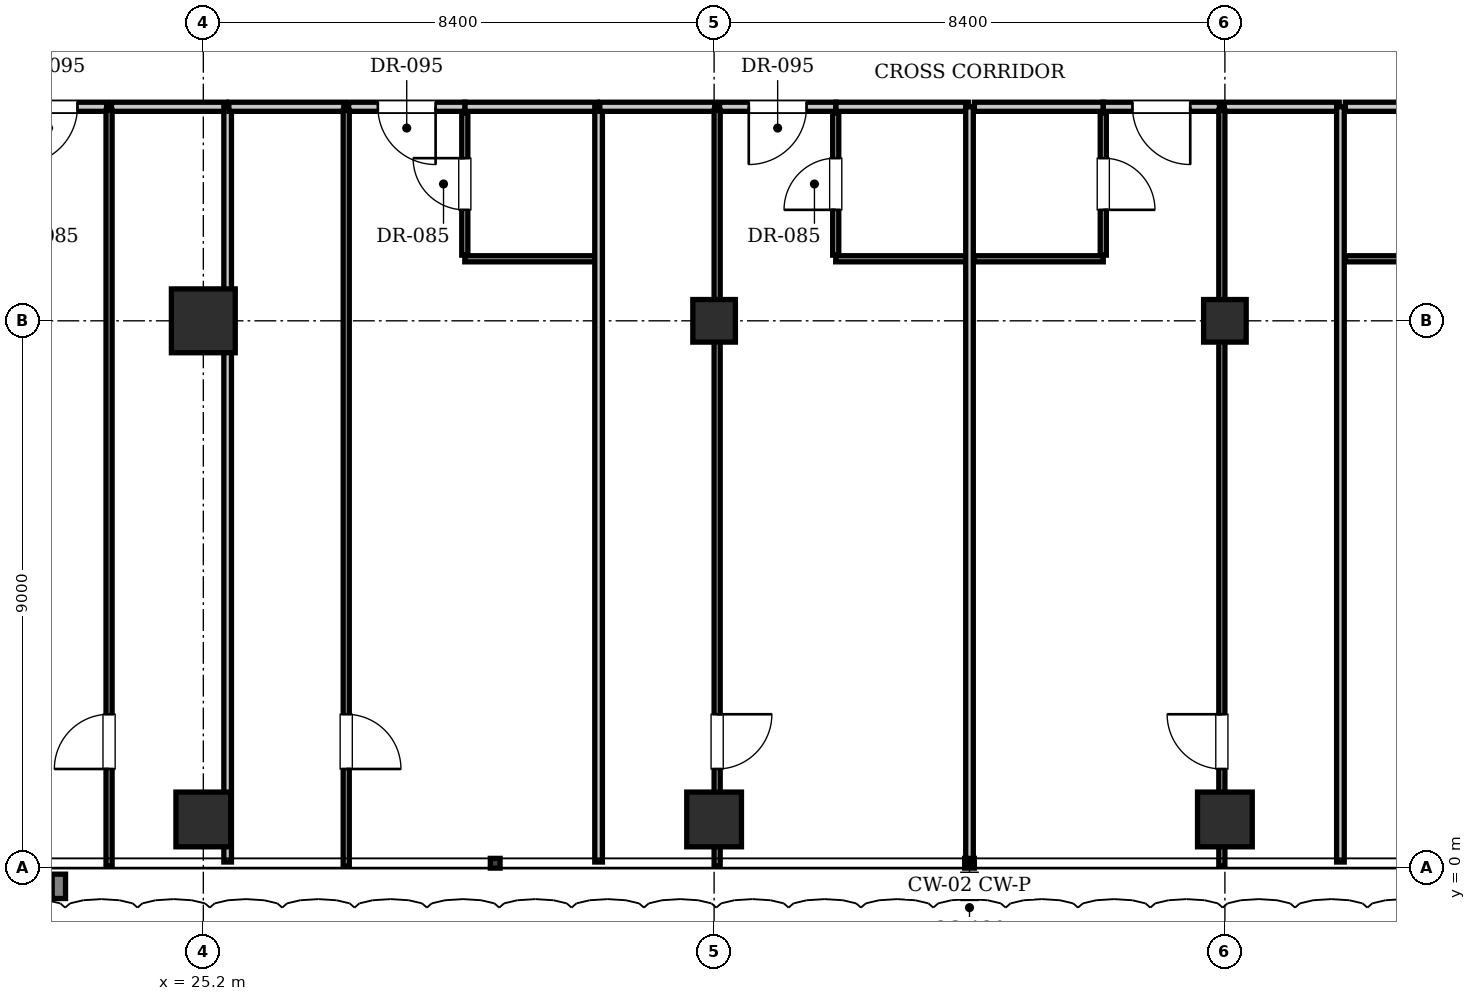
"""IFC4 building model, lengths in metres.
Left out: names, types, materials, properties, quantities, classifications, styles, units other than length and angle.
Written with IfcOpenShell. Run it as: python <this file> out.ifc"""

import sys

from ifc_helpers import new_model, si_unit, direction, frame, frame_2d, origin, origin_2d, place, context, subcontext, project, spatial, rectangle, i_section, extrude, element, fill, save


model = new_model("IFC4")
c1 = context("Model", 3, precision=1e-05, world=origin(), true_north=direction((0.0, 1.0)))
c2 = subcontext(c1, "Body", "Model", "MODEL_VIEW")
j1 = project(units=[si_unit("LENGTHUNIT", "METRE"), si_unit("PLANEANGLEUNIT", "RADIAN")], contexts=[c1])
p1 = place(None, origin())
s1 = spatial("IfcSite", under=j1, at=p1, CompositionType="ELEMENT")
p2 = place(p1, origin())
s2 = spatial("IfcBuilding", under=s1, at=p2, CompositionType="ELEMENT")
p3 = place(p2, frame((0.0, 0.0, 30.8)))
s3 = spatial("IfcBuildingStorey", under=s2, at=p3, CompositionType="ELEMENT", Elevation=30.8)
p4 = place(p3, frame((25.2, 9.0, 0.0), z_axis=(0.0, 0.0, 1.0), x_axis=(1.0, 0.0, 0.0)))
e1 = element("IfcColumn", 1, at=p4, inside=s3, PredefinedType="COLUMN", context=c2, shape_type="SweptSolid", body=[
    extrude(rectangle(XDim=1.05, YDim=1.05, at=origin_2d()), origin(), (0.0, 0.0, 1.0), 3.85),
])
for number, where, z_axis, x_axis in (
    (2, (33.6, 9.0, 0.0), (0.0, 0.0, 1.0), (1.0, 0.0, 0.0)),
    (3, (42.0, 9.0, 0.0), (0.0, 0.0, 1.0), (1.0, 0.0, 0.0)),
):
    element("IfcColumn", number, at=place(p3, frame(where, z_axis=z_axis, x_axis=x_axis)), inside=s3, PredefinedType="COLUMN", context=c2, shape_type="SweptSolid", body=[
        extrude(i_section(OverallWidth=0.7, OverallDepth=0.7, WebThickness=0.028, FlangeThickness=0.044, at=origin_2d()), origin(), (0.0, 0.0, 1.0), 3.85),
    ])
for number, where, z_axis, x_axis in (
    (4, (25.2, 0.8, 0.0), (0.0, 0.0, 1.0), (1.0, 0.0, 0.0)),
    (5, (33.6, 0.8, 0.0), (0.0, 0.0, 1.0), (1.0, 0.0, 0.0)),
    (6, (42.0, 0.8, 0.0), (0.0, 0.0, 1.0), (1.0, 0.0, 0.0)),
):
    element("IfcColumn", number, at=place(p3, frame(where, z_axis=z_axis, x_axis=x_axis)), inside=s3, PredefinedType="COLUMN", context=c2, shape_type="SweptSolid", body=[
        extrude(rectangle(XDim=0.9, YDim=0.9, at=origin_2d()), origin(), (0.0, 0.0, 1.0), 3.85),
    ])
p5 = place(p3, frame((21.7, 12.52, 0.0), z_axis=(0.0, 0.0, 1.0), x_axis=(1.0, 0.0, 0.0)))
e7 = element("IfcWall", 7, at=p5, inside=s3, PredefinedType="PARTITIONING", context=c2, shape_type="SweptSolid", body=[
    extrude(rectangle(XDim=1.91, YDim=0.15, at=frame_2d((0.955, 0.0))), origin(), (0.0, 0.0, 1.0), 3.61),
])
p6 = place(p5, frame((0.48, 0.0, 0.0)))
e8 = element("IfcOpeningElement", 8, at=p6, cuts=e7, PredefinedType="OPENING", context=c2, shape_type="SweptSolid", body=[
    extrude(rectangle(XDim=0.95, YDim=2.15, at=frame_2d((0.475, 1.075))), frame((0.0, 0.085, 0.0), z_axis=(0.0, -1.0, 0.0), x_axis=(1.0, 0.0, 0.0)), (0.0, 0.0, 1.0), 0.17),
])
p7 = place(p3, frame((23.69, 12.52, 0.0), z_axis=(0.0, 0.0, 1.0), x_axis=(1.0, 0.0, 0.0)))
e9 = element("IfcWall", 9, at=p7, inside=s3, PredefinedType="PARTITIONING", context=c2, shape_type="SweptSolid", body=[
    extrude(rectangle(XDim=1.89, YDim=0.15, at=frame_2d((0.945, 0.0))), origin(), (0.0, 0.0, 1.0), 3.61),
])
p8 = place(p3, frame((23.65, 0.03, 0.0), z_axis=(0.0, 0.0, 1.0), x_axis=(0.0, 1.0, 0.0)))
e10 = element("IfcWall", 10, at=p8, inside=s3, PredefinedType="PARTITIONING", context=c2, shape_type="SweptSolid", body=[
    extrude(rectangle(XDim=12.43, YDim=0.1, at=frame_2d((6.215, 0.0))), origin(), (0.0, 0.0, 1.0), 3.61),
])
p9 = place(p8, frame((1.6, 0.0, 0.0)))
e11 = element("IfcOpeningElement", 11, at=p9, cuts=e10, PredefinedType="OPENING", context=c2, shape_type="SweptSolid", body=[
    extrude(rectangle(XDim=0.9, YDim=2.1, at=frame_2d((0.45, 1.05))), frame((0.0, 0.06, 0.0), z_axis=(0.0, -1.0, 0.0), x_axis=(1.0, 0.0, 0.0)), (0.0, 0.0, 1.0), 0.12),
])
p10 = place(p3, frame((25.6, 0.1, 0.0), z_axis=(0.0, 0.0, 1.0), x_axis=(0.0, 1.0, 0.0)))
e12 = element("IfcWall", 12, at=p10, inside=s3, PredefinedType="PARTITIONING", context=c2, shape_type="SweptSolid", body=[
    extrude(rectangle(XDim=12.42, YDim=0.125, at=frame_2d((6.21, 0.0))), origin(), (0.0, 0.0, 1.0), 3.61),
])
p11 = place(p3, frame((29.5, 12.52, 0.0), z_axis=(0.0, 0.0, 1.0), x_axis=(1.0, 0.0, 0.0)))
e13 = element("IfcWall", 13, at=p11, inside=s3, PredefinedType="PARTITIONING", context=c2, shape_type="SweptSolid", body=[
    extrude(rectangle(XDim=2.18, YDim=0.15, at=frame_2d((1.09, 0.0))), origin(), (0.0, 0.0, 1.0), 3.61),
])
p12 = place(p3, frame((29.5, 10.02, 0.0), z_axis=(0.0, 0.0, 1.0), x_axis=(1.0, 0.0, 0.0)))
e14 = element("IfcWall", 14, at=p12, inside=s3, PredefinedType="PARTITIONING", context=c2, shape_type="SweptSolid", body=[
    extrude(rectangle(XDim=2.16, YDim=0.1, at=frame_2d((1.08, 0.0))), origin(), (0.0, 0.0, 1.0), 3.61),
])
p13 = place(p3, frame((29.5, 10.08, 0.0), z_axis=(0.0, 0.0, 1.0), x_axis=(0.0, 1.0, 0.0)))
e15 = element("IfcWall", 15, at=p13, inside=s3, PredefinedType="PARTITIONING", context=c2, shape_type="SweptSolid", body=[
    extrude(rectangle(XDim=2.34, YDim=0.1, at=frame_2d((1.17, 0.0))), origin(), (0.0, 0.0, 1.0), 3.61),
])
p14 = place(p13, frame((0.745, 0.0, 0.0)))
e16 = element("IfcOpeningElement", 16, at=p14, cuts=e15, PredefinedType="OPENING", context=c2, shape_type="SweptSolid", body=[
    extrude(rectangle(XDim=0.85, YDim=2.1, at=frame_2d((0.425, 1.05))), frame((0.0, 0.06, 0.0), z_axis=(0.0, -1.0, 0.0), x_axis=(1.0, 0.0, 0.0)), (0.0, 0.0, 1.0), 0.12),
])
p15 = place(p3, frame((25.62, 12.52, 0.0), z_axis=(0.0, 0.0, 1.0), x_axis=(1.0, 0.0, 0.0)))
e17 = element("IfcWall", 17, at=p15, inside=s3, PredefinedType="PARTITIONING", context=c2, shape_type="SweptSolid", body=[
    extrude(rectangle(XDim=1.89, YDim=0.15, at=frame_2d((0.945, 0.0))), origin(), (0.0, 0.0, 1.0), 3.61),
])
p16 = place(p3, frame((27.59, 12.52, 0.0), z_axis=(0.0, 0.0, 1.0), x_axis=(1.0, 0.0, 0.0)))
e18 = element("IfcWall", 18, at=p16, inside=s3, PredefinedType="PARTITIONING", context=c2, shape_type="SweptSolid", body=[
    extrude(rectangle(XDim=1.91, YDim=0.15, at=frame_2d((0.955, 0.0))), origin(), (0.0, 0.0, 1.0), 3.61),
])
p17 = place(p16, frame((0.48, 0.0, 0.0)))
e19 = element("IfcOpeningElement", 19, at=p17, cuts=e18, PredefinedType="OPENING", context=c2, shape_type="SweptSolid", body=[
    extrude(rectangle(XDim=0.95, YDim=2.15, at=frame_2d((0.475, 1.075))), frame((0.0, 0.085, 0.0), z_axis=(0.0, -1.0, 0.0), x_axis=(1.0, 0.0, 0.0)), (0.0, 0.0, 1.0), 0.17),
])
p18 = place(p3, frame((27.55, 0.03, 0.0), z_axis=(0.0, 0.0, 1.0), x_axis=(0.0, 1.0, 0.0)))
e20 = element("IfcWall", 20, at=p18, inside=s3, PredefinedType="PARTITIONING", context=c2, shape_type="SweptSolid", body=[
    extrude(rectangle(XDim=12.43, YDim=0.1, at=frame_2d((6.215, 0.0))), origin(), (0.0, 0.0, 1.0), 3.61),
])
p19 = place(p18, frame((1.6, 0.0, 0.0)))
e21 = element("IfcOpeningElement", 21, at=p19, cuts=e20, PredefinedType="OPENING", context=c2, shape_type="SweptSolid", body=[
    extrude(rectangle(XDim=0.9, YDim=2.1, at=frame_2d((0.45, 1.05))), frame((0.0, 0.06, 0.0), z_axis=(0.0, -1.0, 0.0), x_axis=(1.0, 0.0, 0.0)), (0.0, 0.0, 1.0), 0.12),
])
p20 = place(p3, frame((31.7, 0.1, 0.0), z_axis=(0.0, 0.0, 1.0), x_axis=(0.0, 1.0, 0.0)))
e22 = element("IfcWall", 22, at=p20, inside=s3, PredefinedType="PARTITIONING", context=c2, shape_type="SweptSolid", body=[
    extrude(rectangle(XDim=12.42, YDim=0.125, at=frame_2d((6.21, 0.0))), origin(), (0.0, 0.0, 1.0), 3.61),
])
p21 = place(p3, frame((35.6, 12.52, 0.0), z_axis=(0.0, 0.0, 1.0), x_axis=(1.0, 0.0, 0.0)))
e23 = element("IfcWall", 23, at=p21, inside=s3, PredefinedType="PARTITIONING", context=c2, shape_type="SweptSolid", body=[
    extrude(rectangle(XDim=2.18, YDim=0.15, at=frame_2d((1.09, 0.0))), origin(), (0.0, 0.0, 1.0), 3.61),
])
p22 = place(p3, frame((35.6, 10.02, 0.0), z_axis=(0.0, 0.0, 1.0), x_axis=(1.0, 0.0, 0.0)))
e24 = element("IfcWall", 24, at=p22, inside=s3, PredefinedType="PARTITIONING", context=c2, shape_type="SweptSolid", body=[
    extrude(rectangle(XDim=2.16, YDim=0.1, at=frame_2d((1.08, 0.0))), origin(), (0.0, 0.0, 1.0), 3.61),
])
p23 = place(p3, frame((35.6, 10.08, 0.0), z_axis=(0.0, 0.0, 1.0), x_axis=(0.0, 1.0, 0.0)))
e25 = element("IfcWall", 25, at=p23, inside=s3, PredefinedType="PARTITIONING", context=c2, shape_type="SweptSolid", body=[
    extrude(rectangle(XDim=2.34, YDim=0.1, at=frame_2d((1.17, 0.0))), origin(), (0.0, 0.0, 1.0), 3.61),
])
p24 = place(p23, frame((0.745, 0.0, 0.0)))
e26 = element("IfcOpeningElement", 26, at=p24, cuts=e25, PredefinedType="OPENING", context=c2, shape_type="SweptSolid", body=[
    extrude(rectangle(XDim=0.85, YDim=2.1, at=frame_2d((0.425, 1.05))), frame((0.0, 0.06, 0.0), z_axis=(0.0, -1.0, 0.0), x_axis=(1.0, 0.0, 0.0)), (0.0, 0.0, 1.0), 0.12),
])
p25 = place(p3, frame((31.72, 12.52, 0.0), z_axis=(0.0, 0.0, 1.0), x_axis=(1.0, 0.0, 0.0)))
e27 = element("IfcWall", 27, at=p25, inside=s3, PredefinedType="PARTITIONING", context=c2, shape_type="SweptSolid", body=[
    extrude(rectangle(XDim=1.89, YDim=0.15, at=frame_2d((0.945, 0.0))), origin(), (0.0, 0.0, 1.0), 3.61),
])
p26 = place(p3, frame((33.69, 12.52, 0.0), z_axis=(0.0, 0.0, 1.0), x_axis=(1.0, 0.0, 0.0)))
e28 = element("IfcWall", 28, at=p26, inside=s3, PredefinedType="PARTITIONING", context=c2, shape_type="SweptSolid", body=[
    extrude(rectangle(XDim=1.91, YDim=0.15, at=frame_2d((0.955, 0.0))), origin(), (0.0, 0.0, 1.0), 3.61),
])
p27 = place(p26, frame((0.48, 0.0, 0.0)))
e29 = element("IfcOpeningElement", 29, at=p27, cuts=e28, PredefinedType="OPENING", context=c2, shape_type="SweptSolid", body=[
    extrude(rectangle(XDim=0.95, YDim=2.15, at=frame_2d((0.475, 1.075))), frame((0.0, 0.085, 0.0), z_axis=(0.0, -1.0, 0.0), x_axis=(1.0, 0.0, 0.0)), (0.0, 0.0, 1.0), 0.17),
])
p28 = place(p3, frame((33.65, 0.03, 0.0), z_axis=(0.0, 0.0, 1.0), x_axis=(0.0, 1.0, 0.0)))
e30 = element("IfcWall", 30, at=p28, inside=s3, PredefinedType="PARTITIONING", context=c2, shape_type="SweptSolid", body=[
    extrude(rectangle(XDim=12.43, YDim=0.1, at=frame_2d((6.215, 0.0))), origin(), (0.0, 0.0, 1.0), 2.975),
])
p29 = place(p28, frame((1.6, 0.0, 0.0)))
e31 = element("IfcOpeningElement", 31, at=p29, cuts=e30, PredefinedType="OPENING", context=c2, shape_type="SweptSolid", body=[
    extrude(rectangle(XDim=0.9, YDim=2.1, at=frame_2d((0.45, 1.05))), frame((0.0, 0.06, 0.0), z_axis=(0.0, -1.0, 0.0), x_axis=(1.0, 0.0, 0.0)), (0.0, 0.0, 1.0), 0.12),
])
p30 = place(p3, frame((37.8, 0.1, 0.0), z_axis=(0.0, 0.0, 1.0), x_axis=(0.0, 1.0, 0.0)))
e32 = element("IfcWall", 32, at=p30, inside=s3, PredefinedType="PARTITIONING", context=c2, shape_type="SweptSolid", body=[
    extrude(rectangle(XDim=12.42, YDim=0.125, at=frame_2d((6.21, 0.0))), origin(), (0.0, 0.0, 1.0), 3.207),
])
p31 = place(p3, frame((37.88, 12.52, 0.0), z_axis=(0.0, 0.0, 1.0), x_axis=(1.0, 0.0, 0.0)))
e33 = element("IfcWall", 33, at=p31, inside=s3, PredefinedType="PARTITIONING", context=c2, shape_type="SweptSolid", body=[
    extrude(rectangle(XDim=2.12, YDim=0.15, at=frame_2d((1.06, 0.0))), origin(), (0.0, 0.0, 1.0), 3.61),
])
p32 = place(p3, frame((37.88, 10.02, 0.0), z_axis=(0.0, 0.0, 1.0), x_axis=(1.0, 0.0, 0.0)))
e34 = element("IfcWall", 34, at=p32, inside=s3, PredefinedType="PARTITIONING", context=c2, shape_type="SweptSolid", body=[
    extrude(rectangle(XDim=2.12, YDim=0.1, at=frame_2d((1.06, 0.0))), origin(), (0.0, 0.0, 1.0), 3.61),
])
p33 = place(p3, frame((40.0, 10.08, 0.0), z_axis=(0.0, 0.0, 1.0), x_axis=(0.0, 1.0, 0.0)))
e35 = element("IfcWall", 35, at=p33, inside=s3, PredefinedType="PARTITIONING", context=c2, shape_type="SweptSolid", body=[
    extrude(rectangle(XDim=2.34, YDim=0.1, at=frame_2d((1.17, 0.0))), origin(), (0.0, 0.0, 1.0), 3.61),
])
p34 = place(p33, frame((0.745, 0.0, 0.0)))
e36 = element("IfcOpeningElement", 36, at=p34, cuts=e35, PredefinedType="OPENING", context=c2, shape_type="SweptSolid", body=[
    extrude(rectangle(XDim=0.85, YDim=2.1, at=frame_2d((0.425, 1.05))), frame((0.0, 0.06, 0.0), z_axis=(0.0, -1.0, 0.0), x_axis=(1.0, 0.0, 0.0)), (0.0, 0.0, 1.0), 0.12),
])
p35 = place(p3, frame((40.0, 12.52, 0.0), z_axis=(0.0, 0.0, 1.0), x_axis=(1.0, 0.0, 0.0)))
e37 = element("IfcWall", 37, at=p35, inside=s3, PredefinedType="PARTITIONING", context=c2, shape_type="SweptSolid", body=[
    extrude(rectangle(XDim=1.91, YDim=0.15, at=frame_2d((0.955, 0.0))), origin(), (0.0, 0.0, 1.0), 3.61),
])
p36 = place(p35, frame((0.48, 0.0, 0.0)))
e38 = element("IfcOpeningElement", 38, at=p36, cuts=e37, PredefinedType="OPENING", context=c2, shape_type="SweptSolid", body=[
    extrude(rectangle(XDim=0.95, YDim=2.15, at=frame_2d((0.475, 1.075))), frame((0.0, 0.085, 0.0), z_axis=(0.0, -1.0, 0.0), x_axis=(1.0, 0.0, 0.0)), (0.0, 0.0, 1.0), 0.17),
])
p37 = place(p3, frame((41.99, 12.52, 0.0), z_axis=(0.0, 0.0, 1.0), x_axis=(1.0, 0.0, 0.0)))
e39 = element("IfcWall", 39, at=p37, inside=s3, PredefinedType="PARTITIONING", context=c2, shape_type="SweptSolid", body=[
    extrude(rectangle(XDim=1.89, YDim=0.15, at=frame_2d((0.945, 0.0))), origin(), (0.0, 0.0, 1.0), 3.61),
])
p38 = place(p3, frame((41.95, 0.03, 0.0), z_axis=(0.0, 0.0, 1.0), x_axis=(0.0, 1.0, 0.0)))
e40 = element("IfcWall", 40, at=p38, inside=s3, PredefinedType="PARTITIONING", context=c2, shape_type="SweptSolid", body=[
    extrude(rectangle(XDim=12.43, YDim=0.1, at=frame_2d((6.215, 0.0))), origin(), (0.0, 0.0, 1.0), 2.975),
])
p39 = place(p38, frame((1.6, 0.0, 0.0)))
e41 = element("IfcOpeningElement", 41, at=p39, cuts=e40, PredefinedType="OPENING", context=c2, shape_type="SweptSolid", body=[
    extrude(rectangle(XDim=0.9, YDim=2.1, at=frame_2d((0.45, 1.05))), frame((0.0, 0.06, 0.0), z_axis=(0.0, -1.0, 0.0), x_axis=(1.0, 0.0, 0.0)), (0.0, 0.0, 1.0), 0.12),
])
p40 = place(p3, frame((43.9, 0.1, 0.0), z_axis=(0.0, 0.0, 1.0), x_axis=(0.0, 1.0, 0.0)))
e42 = element("IfcWall", 42, at=p40, inside=s3, PredefinedType="PARTITIONING", context=c2, shape_type="SweptSolid", body=[
    extrude(rectangle(XDim=12.42, YDim=0.125, at=frame_2d((6.21, 0.0))), origin(), (0.0, 0.0, 1.0), 3.61),
])
p41 = place(p3, frame((43.98, 12.52, 0.0), z_axis=(0.0, 0.0, 1.0), x_axis=(1.0, 0.0, 0.0)))
e43 = element("IfcWall", 43, at=p41, inside=s3, PredefinedType="PARTITIONING", context=c2, shape_type="SweptSolid", body=[
    extrude(rectangle(XDim=2.12, YDim=0.15, at=frame_2d((1.06, 0.0))), origin(), (0.0, 0.0, 1.0), 3.61),
])
p42 = place(p3, frame((43.98, 10.02, 0.0), z_axis=(0.0, 0.0, 1.0), x_axis=(1.0, 0.0, 0.0)))
e44 = element("IfcWall", 44, at=p42, inside=s3, PredefinedType="PARTITIONING", context=c2, shape_type="SweptSolid", body=[
    extrude(rectangle(XDim=2.12, YDim=0.1, at=frame_2d((1.06, 0.0))), origin(), (0.0, 0.0, 1.0), 3.61),
])
p43 = place(p6, frame((0.95, 0.0, 0.0), z_axis=(0.0, 0.0, 1.0), x_axis=(-1.0, 0.0, 0.0)))
e45 = element("IfcDoor", 45, at=p43, inside=s3, OperationType="SINGLE_SWING_RIGHT", PredefinedType="DOOR", context=c2, shape_type="SweptSolid", body=[
    extrude(rectangle(XDim=0.95, YDim=2.15, at=frame_2d((0.475, 1.075))), frame((0.0, 0.025, 0.0), z_axis=(0.0, -1.0, 0.0), x_axis=(1.0, 0.0, 0.0)), (0.0, 0.0, 1.0), 0.05),
])
fill(e8, e45)
p44 = place(p9, origin())
e46 = element("IfcDoor", 46, at=p44, inside=s3, OperationType="SINGLE_SWING_LEFT", PredefinedType="DOOR", context=c2, shape_type="SweptSolid", body=[
    extrude(rectangle(XDim=0.9, YDim=2.1, at=frame_2d((0.45, 1.05))), frame((0.0, 0.025, 0.0), z_axis=(0.0, -1.0, 0.0), x_axis=(1.0, 0.0, 0.0)), (0.0, 0.0, 1.0), 0.05),
])
fill(e11, e46)
p45 = place(p14, origin())
e47 = element("IfcDoor", 47, at=p45, inside=s3, OperationType="SINGLE_SWING_RIGHT", PredefinedType="DOOR", context=c2, shape_type="SweptSolid", body=[
    extrude(rectangle(XDim=0.85, YDim=2.1, at=frame_2d((0.425, 1.05))), frame((0.0, 0.025, 0.0), z_axis=(0.0, -1.0, 0.0), x_axis=(1.0, 0.0, 0.0)), (0.0, 0.0, 1.0), 0.05),
])
fill(e16, e47)
p46 = place(p17, frame((0.95, 0.0, 0.0), z_axis=(0.0, 0.0, 1.0), x_axis=(-1.0, 0.0, 0.0)))
e48 = element("IfcDoor", 48, at=p46, inside=s3, OperationType="SINGLE_SWING_LEFT", PredefinedType="DOOR", context=c2, shape_type="SweptSolid", body=[
    extrude(rectangle(XDim=0.95, YDim=2.15, at=frame_2d((0.475, 1.075))), frame((0.0, 0.025, 0.0), z_axis=(0.0, -1.0, 0.0), x_axis=(1.0, 0.0, 0.0)), (0.0, 0.0, 1.0), 0.05),
])
fill(e19, e48)
p47 = place(p19, frame((0.9, 0.0, 0.0), z_axis=(0.0, 0.0, 1.0), x_axis=(-1.0, 0.0, 0.0)))
e49 = element("IfcDoor", 49, at=p47, inside=s3, OperationType="SINGLE_SWING_RIGHT", PredefinedType="DOOR", context=c2, shape_type="SweptSolid", body=[
    extrude(rectangle(XDim=0.9, YDim=2.1, at=frame_2d((0.45, 1.05))), frame((0.0, 0.025, 0.0), z_axis=(0.0, -1.0, 0.0), x_axis=(1.0, 0.0, 0.0)), (0.0, 0.0, 1.0), 0.05),
])
fill(e21, e49)
p48 = place(p24, origin())
e50 = element("IfcDoor", 50, at=p48, inside=s3, OperationType="SINGLE_SWING_LEFT", PredefinedType="DOOR", context=c2, shape_type="SweptSolid", body=[
    extrude(rectangle(XDim=0.85, YDim=2.1, at=frame_2d((0.425, 1.05))), frame((0.0, 0.025, 0.0), z_axis=(0.0, -1.0, 0.0), x_axis=(1.0, 0.0, 0.0)), (0.0, 0.0, 1.0), 0.05),
])
fill(e26, e50)
p49 = place(p27, frame((0.95, 0.0, 0.0), z_axis=(0.0, 0.0, 1.0), x_axis=(-1.0, 0.0, 0.0)))
e51 = element("IfcDoor", 51, at=p49, inside=s3, OperationType="SINGLE_SWING_RIGHT", PredefinedType="DOOR", context=c2, shape_type="SweptSolid", body=[
    extrude(rectangle(XDim=0.95, YDim=2.15, at=frame_2d((0.475, 1.075))), frame((0.0, 0.025, 0.0), z_axis=(0.0, -1.0, 0.0), x_axis=(1.0, 0.0, 0.0)), (0.0, 0.0, 1.0), 0.05),
])
fill(e29, e51)
p50 = place(p29, frame((0.9, 0.0, 0.0), z_axis=(0.0, 0.0, 1.0), x_axis=(-1.0, 0.0, 0.0)))
e52 = element("IfcDoor", 52, at=p50, inside=s3, OperationType="SINGLE_SWING_LEFT", PredefinedType="DOOR", context=c2, shape_type="SweptSolid", body=[
    extrude(rectangle(XDim=0.9, YDim=2.1, at=frame_2d((0.45, 1.05))), frame((0.0, 0.025, 0.0), z_axis=(0.0, -1.0, 0.0), x_axis=(1.0, 0.0, 0.0)), (0.0, 0.0, 1.0), 0.05),
])
fill(e31, e52)
p51 = place(p34, frame((0.85, 0.0, 0.0), z_axis=(0.0, 0.0, 1.0), x_axis=(-1.0, 0.0, 0.0)))
e53 = element("IfcDoor", 53, at=p51, inside=s3, OperationType="SINGLE_SWING_RIGHT", PredefinedType="DOOR", context=c2, shape_type="SweptSolid", body=[
    extrude(rectangle(XDim=0.85, YDim=2.1, at=frame_2d((0.425, 1.05))), frame((0.0, 0.025, 0.0), z_axis=(0.0, -1.0, 0.0), x_axis=(1.0, 0.0, 0.0)), (0.0, 0.0, 1.0), 0.05),
])
fill(e36, e53)
p52 = place(p36, frame((0.95, 0.0, 0.0), z_axis=(0.0, 0.0, 1.0), x_axis=(-1.0, 0.0, 0.0)))
e54 = element("IfcDoor", 54, at=p52, inside=s3, OperationType="SINGLE_SWING_LEFT", PredefinedType="DOOR", context=c2, shape_type="SweptSolid", body=[
    extrude(rectangle(XDim=0.95, YDim=2.15, at=frame_2d((0.475, 1.075))), frame((0.0, 0.025, 0.0), z_axis=(0.0, -1.0, 0.0), x_axis=(1.0, 0.0, 0.0)), (0.0, 0.0, 1.0), 0.05),
])
fill(e38, e54)
p53 = place(p39, origin())
e55 = element("IfcDoor", 55, at=p53, inside=s3, OperationType="SINGLE_SWING_RIGHT", PredefinedType="DOOR", context=c2, shape_type="SweptSolid", body=[
    extrude(rectangle(XDim=0.9, YDim=2.1, at=frame_2d((0.45, 1.05))), frame((0.0, 0.025, 0.0), z_axis=(0.0, -1.0, 0.0), x_axis=(1.0, 0.0, 0.0)), (0.0, 0.0, 1.0), 0.05),
])
fill(e41, e55)
save(model, sys.argv[1])
